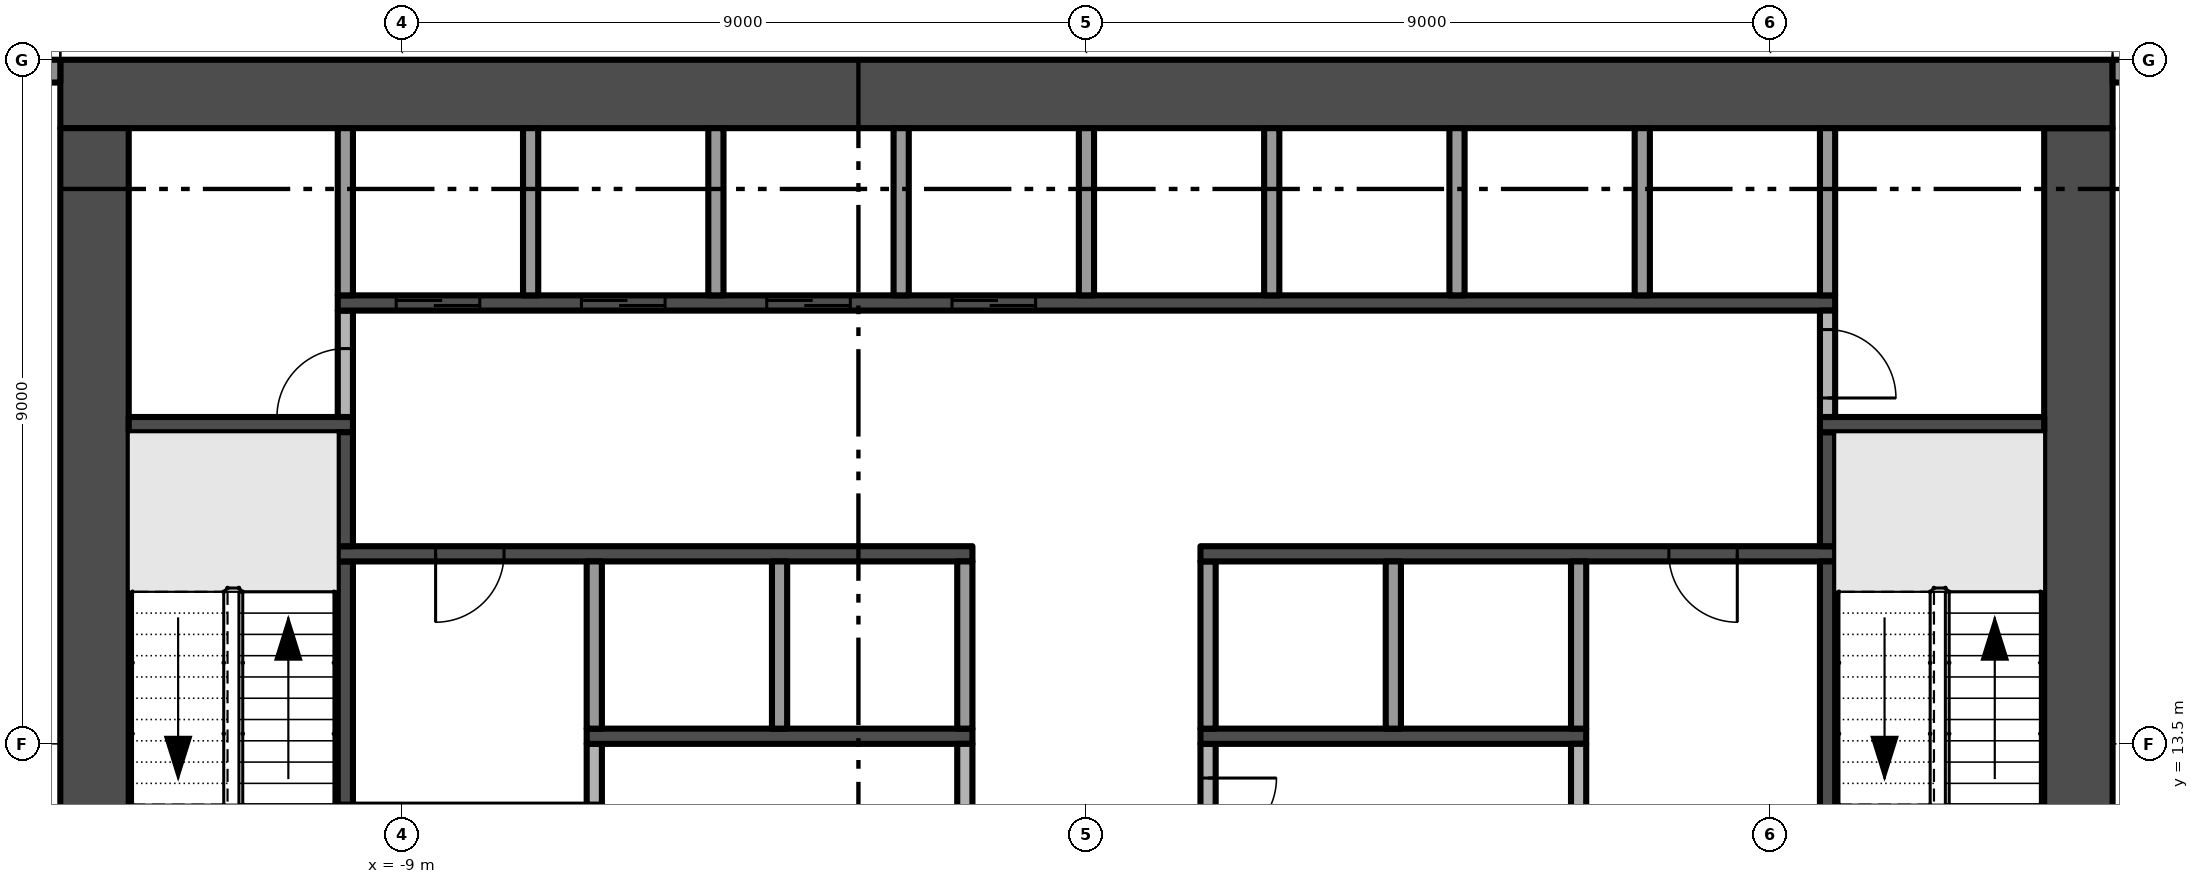
"""IFC4 building model, lengths in metres.
Left out: names, types, materials, properties, quantities, classifications, styles, units other than length and angle.
Written with IfcOpenShell. Run it as: python <this file> out.ifc"""

import sys

from ifc_helpers import new_model, si_unit, direction, frame, frame_2d, origin, place, context, subcontext, project, spatial, rectangle, extrude, element, fill, save


model = new_model("IFC4")
c1 = context("Model", 3, precision=1e-05, world=origin(), true_north=direction((0.0, 1.0)))
c2 = subcontext(c1, "Body", "Model", "MODEL_VIEW")
j1 = project(units=[si_unit("LENGTHUNIT", "METRE"), si_unit("PLANEANGLEUNIT", "RADIAN")], contexts=[c1])
p1 = place(None, origin())
s1 = spatial("IfcSite", under=j1, at=p1, CompositionType="ELEMENT")
p2 = place(p1, origin())
s2 = spatial("IfcBuilding", under=s1, at=p2, CompositionType="ELEMENT")
p3 = place(p2, frame((0.0, 0.0, 22.6)))
s3 = spatial("IfcBuildingStorey", under=s2, at=p3, CompositionType="ELEMENT", Elevation=22.6)
p4 = place(p3, frame((13.05, 5.4, -0.3), z_axis=(0.0, 0.0, 1.0), x_axis=(0.0, 1.0, 0.0)))
e1 = element("IfcWall", 1, at=p4, inside=s3, PredefinedType="SHEAR", context=c2, shape_type="SweptSolid", body=[
    extrude(rectangle(XDim=16.2, YDim=0.9, at=frame_2d((8.1, 0.0))), origin(), (0.0, 0.0, 1.0), 3.8),
])
p5 = place(p4, frame((6.0, 0.0, 0.3)))
e2 = element("IfcOpeningElement", 2, at=p5, cuts=e1, PredefinedType="OPENING", context=c2, shape_type="SweptSolid", body=[
    extrude(rectangle(XDim=1.2, YDim=2.2, at=frame_2d((0.6, 1.1))), frame((0.0, 0.46, 0.0), z_axis=(0.0, -1.0, 0.0), x_axis=(1.0, 0.0, 0.0)), (0.0, 0.0, 1.0), 0.92),
])
p6 = place(p3, frame((13.5, 22.05, -0.3), z_axis=(0.0, 0.0, 1.0), x_axis=(-1.0, 0.0, 0.0)))
e3 = element("IfcWall", 3, at=p6, inside=s3, PredefinedType="SHEAR", context=c2, shape_type="SweptSolid", body=[
    extrude(rectangle(XDim=27.0, YDim=0.9, at=frame_2d((13.5, 0.0))), origin(), (0.0, 0.0, 1.0), 3.8),
])
p7 = place(p3, frame((-13.05, 21.6, -0.3), z_axis=(0.0, 0.0, 1.0), x_axis=(0.0, -1.0, 0.0)))
e4 = element("IfcWall", 4, at=p7, inside=s3, PredefinedType="SHEAR", context=c2, shape_type="SweptSolid", body=[
    extrude(rectangle(XDim=16.2, YDim=0.9, at=frame_2d((8.1, 0.0))), origin(), (0.0, 0.0, 1.0), 3.8),
])
p8 = place(p7, frame((9.0, 0.0, 0.3)))
e5 = element("IfcOpeningElement", 5, at=p8, cuts=e4, PredefinedType="OPENING", context=c2, shape_type="SweptSolid", body=[
    extrude(rectangle(XDim=1.2, YDim=2.2, at=frame_2d((0.6, 1.1))), frame((0.0, 0.46, 0.0), z_axis=(0.0, -1.0, 0.0), x_axis=(1.0, 0.0, 0.0)), (0.0, 0.0, 1.0), 0.92),
])
p9 = place(p3, frame((13.5, 22.35, 0.0), z_axis=(0.0, 0.0, 1.0), x_axis=(1.0, 0.0, 0.0)))
e6 = element("IfcWall", 6, at=p9, inside=s3, PredefinedType="SOLIDWALL", context=c2, shape_type="SweptSolid", body=[
    extrude(rectangle(XDim=3.775, YDim=0.3, at=frame_2d((1.887, 0.0))), origin(), (0.0, 0.0, 1.0), 3.5),
])
p10 = place(p9, frame((0.85, 0.0, 0.45)))
e7 = element("IfcOpeningElement", 7, at=p10, cuts=e6, PredefinedType="OPENING", context=c2, shape_type="SweptSolid", body=[
    extrude(rectangle(XDim=2.6, YDim=2.65, at=frame_2d((1.3, 1.325))), frame((0.0, 0.16, 0.0), z_axis=(0.0, -1.0, 0.0), x_axis=(1.0, 0.0, 0.0)), (0.0, 0.0, 1.0), 0.32),
])
p11 = place(p3, frame((-17.275, 22.35, 0.0), z_axis=(0.0, 0.0, 1.0), x_axis=(1.0, 0.0, 0.0)))
e8 = element("IfcWall", 8, at=p11, inside=s3, PredefinedType="SOLIDWALL", context=c2, shape_type="SweptSolid", body=[
    extrude(rectangle(XDim=3.775, YDim=0.3, at=frame_2d((1.887, 0.0))), origin(), (0.0, 0.0, 1.0), 3.5),
])
p12 = place(p11, frame((0.325, 0.0, 0.0)))
e9 = element("IfcOpeningElement", 9, at=p12, cuts=e8, PredefinedType="OPENING", context=c2, shape_type="SweptSolid", body=[
    extrude(rectangle(XDim=2.6, YDim=2.4, at=frame_2d((1.3, 1.2))), frame((0.0, 0.16, 0.0), z_axis=(0.0, -1.0, 0.0), x_axis=(1.0, 0.0, 0.0)), (0.0, 0.0, 1.0), 0.32),
])
p13 = place(p3, frame((-12.6, 17.7, 0.0), z_axis=(0.0, 0.0, 1.0), x_axis=(1.0, 0.0, 0.0)))
e10 = element("IfcWall", 10, at=p13, inside=s3, PredefinedType="SHEAR", context=c2, shape_type="SweptSolid", body=[
    extrude(rectangle(XDim=2.95, YDim=0.2, at=frame_2d((1.475, 0.0))), origin(), (0.0, 0.0, 1.0), 3.5),
])
p14 = place(p3, frame((-9.75, 12.7, 0.0), z_axis=(0.0, 0.0, 1.0), x_axis=(0.0, 1.0, 0.0)))
e11 = element("IfcWall", 11, at=p14, inside=s3, PredefinedType="SHEAR", context=c2, shape_type="SweptSolid", body=[
    extrude(rectangle(XDim=3.2, YDim=0.2, at=frame_2d((1.6, 0.0))), origin(), (0.0, 0.0, 1.0), 3.5),
])
p15 = place(p3, frame((-1.5, 16.0, 0.0), z_axis=(0.0, 0.0, 1.0), x_axis=(-1.0, 0.0, 0.0)))
e12 = element("IfcWall", 12, at=p15, inside=s3, PredefinedType="SHEAR", context=c2, shape_type="SweptSolid", body=[
    extrude(rectangle(XDim=8.35, YDim=0.2, at=frame_2d((4.175, 0.0))), origin(), (0.0, 0.0, 1.0), 3.5),
])
p16 = place(p15, frame((6.162, 0.0, 0.0)))
e13 = element("IfcOpeningElement", 13, at=p16, cuts=e12, PredefinedType="OPENING", context=c2, shape_type="SweptSolid", body=[
    extrude(rectangle(XDim=0.9, YDim=2.1, at=frame_2d((0.45, 1.05))), frame((0.0, 0.11, 0.0), z_axis=(0.0, -1.0, 0.0), x_axis=(1.0, 0.0, 0.0)), (0.0, 0.0, 1.0), 0.22),
])
p17 = place(p3, frame((-9.75, 16.1, 0.0), z_axis=(0.0, 0.0, 1.0), x_axis=(0.0, 1.0, 0.0)))
e14 = element("IfcWall", 14, at=p17, inside=s3, PredefinedType="SHEAR", context=c2, shape_type="SweptSolid", body=[
    extrude(rectangle(XDim=1.5, YDim=0.2, at=frame_2d((0.75, 0.0))), origin(), (0.0, 0.0, 1.0), 3.5),
])
p18 = place(p3, frame((-9.75, 17.8, 0.0), z_axis=(0.0, 0.0, 1.0), x_axis=(0.0, 1.0, 0.0)))
e15 = element("IfcWall", 15, at=p18, inside=s3, PredefinedType="PARTITIONING", context=c2, shape_type="SweptSolid", body=[
    extrude(rectangle(XDim=1.4, YDim=0.2, at=frame_2d((0.7, 0.0))), origin(), (0.0, 0.0, 1.0), 3.5),
])
p19 = place(p18, origin())
e16 = element("IfcOpeningElement", 16, at=p19, cuts=e15, PredefinedType="OPENING", context=c2, shape_type="SweptSolid", body=[
    extrude(rectangle(XDim=0.9, YDim=2.1, at=frame_2d((0.45, 1.05))), frame((0.0, 0.11, 0.0), z_axis=(0.0, -1.0, 0.0), x_axis=(1.0, 0.0, 0.0)), (0.0, 0.0, 1.0), 0.22),
])
p20 = place(p3, frame((-9.85, 19.3, 0.0), z_axis=(0.0, 0.0, 1.0), x_axis=(1.0, 0.0, 0.0)))
e17 = element("IfcWall", 17, at=p20, inside=s3, PredefinedType="SHEAR", context=c2, shape_type="SweptSolid", body=[
    extrude(rectangle(XDim=19.7, YDim=0.2, at=frame_2d((9.85, 0.0))), origin(), (0.0, 0.0, 1.0), 3.5),
])
p21 = place(p20, frame((0.769, 0.0, 0.0)))
e18 = element("IfcOpeningElement", 18, at=p21, cuts=e17, PredefinedType="OPENING", context=c2, shape_type="SweptSolid", body=[
    extrude(rectangle(XDim=1.1, YDim=2.1, at=frame_2d((0.55, 1.05))), frame((0.0, 0.11, 0.0), z_axis=(0.0, -1.0, 0.0), x_axis=(1.0, 0.0, 0.0)), (0.0, 0.0, 1.0), 0.22),
])
p22 = place(p20, frame((3.206, 0.0, 0.0)))
e19 = element("IfcOpeningElement", 19, at=p22, cuts=e17, PredefinedType="OPENING", context=c2, shape_type="SweptSolid", body=[
    extrude(rectangle(XDim=1.1, YDim=2.1, at=frame_2d((0.55, 1.05))), frame((0.0, 0.11, 0.0), z_axis=(0.0, -1.0, 0.0), x_axis=(1.0, 0.0, 0.0)), (0.0, 0.0, 1.0), 0.22),
])
p23 = place(p20, frame((5.644, 0.0, 0.0)))
e20 = element("IfcOpeningElement", 20, at=p23, cuts=e17, PredefinedType="OPENING", context=c2, shape_type="SweptSolid", body=[
    extrude(rectangle(XDim=1.1, YDim=2.1, at=frame_2d((0.55, 1.05))), frame((0.0, 0.11, 0.0), z_axis=(0.0, -1.0, 0.0), x_axis=(1.0, 0.0, 0.0)), (0.0, 0.0, 1.0), 0.22),
])
p24 = place(p20, frame((8.081, 0.0, 0.0)))
e21 = element("IfcOpeningElement", 21, at=p24, cuts=e17, PredefinedType="OPENING", context=c2, shape_type="SweptSolid", body=[
    extrude(rectangle(XDim=1.1, YDim=2.1, at=frame_2d((0.55, 1.05))), frame((0.0, 0.11, 0.0), z_axis=(0.0, -1.0, 0.0), x_axis=(1.0, 0.0, 0.0)), (0.0, 0.0, 1.0), 0.22),
])
for number, where, z_axis, x_axis in (
    (22, (-9.75, 19.4, 0.0), (0.0, 0.0, 1.0), (0.0, 1.0, 0.0)),
    (23, (-7.312, 19.4, 0.0), (0.0, 0.0, 1.0), (0.0, 1.0, 0.0)),
):
    element("IfcWall", number, at=place(p3, frame(where, z_axis=z_axis, x_axis=x_axis)), inside=s3, PredefinedType="PARTITIONING", context=c2, shape_type="SweptSolid", body=[
        extrude(rectangle(XDim=2.2, YDim=0.2, at=frame_2d((1.1, 0.0))), origin(), (0.0, 0.0, 1.0), 3.5),
    ])
p25 = place(p3, frame((-6.475, 12.7, 0.0), z_axis=(0.0, 0.0, 1.0), x_axis=(0.0, 1.0, 0.0)))
e24 = element("IfcWall", 24, at=p25, inside=s3, PredefinedType="PARTITIONING", context=c2, shape_type="SweptSolid", body=[
    extrude(rectangle(XDim=0.8, YDim=0.2, at=frame_2d((0.4, 0.0))), origin(), (0.0, 0.0, 1.0), 3.5),
])
p26 = place(p3, frame((-6.575, 13.6, 0.0), z_axis=(0.0, 0.0, 1.0), x_axis=(1.0, 0.0, 0.0)))
e25 = element("IfcWall", 25, at=p26, inside=s3, PredefinedType="SHEAR", context=c2, shape_type="SweptSolid", body=[
    extrude(rectangle(XDim=5.075, YDim=0.2, at=frame_2d((2.538, 0.0))), origin(), (0.0, 0.0, 1.0), 3.5),
])
for number, where, z_axis, x_axis in (
    (26, (-6.475, 13.7, 0.0), (0.0, 0.0, 1.0), (0.0, 1.0, 0.0)),
    (27, (-4.875, 19.4, 0.0), (0.0, 0.0, 1.0), (0.0, 1.0, 0.0)),
    (28, (-4.037, 13.7, 0.0), (0.0, 0.0, 1.0), (0.0, 1.0, 0.0)),
    (29, (-2.438, 19.4, 0.0), (0.0, 0.0, 1.0), (0.0, 1.0, 0.0)),
):
    element("IfcWall", number, at=place(p3, frame(where, z_axis=z_axis, x_axis=x_axis)), inside=s3, PredefinedType="PARTITIONING", context=c2, shape_type="SweptSolid", body=[
        extrude(rectangle(XDim=2.2, YDim=0.2, at=frame_2d((1.1, 0.0))), origin(), (0.0, 0.0, 1.0), 3.5),
    ])
p27 = place(p3, frame((-1.6, 10.5, 0.0), z_axis=(0.0, 0.0, 1.0), x_axis=(0.0, 1.0, 0.0)))
e30 = element("IfcWall", 30, at=p27, inside=s3, PredefinedType="PARTITIONING", context=c2, shape_type="SweptSolid", body=[
    extrude(rectangle(XDim=3.0, YDim=0.2, at=frame_2d((1.5, 0.0))), origin(), (0.0, 0.0, 1.0), 3.5),
])
p28 = place(p27, frame((1.05, 0.0, 0.0)))
e31 = element("IfcOpeningElement", 31, at=p28, cuts=e30, PredefinedType="OPENING", context=c2, shape_type="SweptSolid", body=[
    extrude(rectangle(XDim=0.9, YDim=2.1, at=frame_2d((0.45, 1.05))), frame((0.0, 0.11, 0.0), z_axis=(0.0, -1.0, 0.0), x_axis=(1.0, 0.0, 0.0)), (0.0, 0.0, 1.0), 0.22),
])
for number, where, z_axis, x_axis in (
    (32, (-1.6, 13.7, 0.0), (0.0, 0.0, 1.0), (0.0, 1.0, 0.0)),
    (33, (0.0, 19.4, 0.0), (0.0, 0.0, 1.0), (0.0, 1.0, 0.0)),
):
    element("IfcWall", number, at=place(p3, frame(where, z_axis=z_axis, x_axis=x_axis)), inside=s3, PredefinedType="PARTITIONING", context=c2, shape_type="SweptSolid", body=[
        extrude(rectangle(XDim=2.2, YDim=0.2, at=frame_2d((1.1, 0.0))), origin(), (0.0, 0.0, 1.0), 3.5),
    ])
p29 = place(p3, frame((1.6, 13.5, 0.0), z_axis=(0.0, 0.0, 1.0), x_axis=(0.0, -1.0, 0.0)))
e34 = element("IfcWall", 34, at=p29, inside=s3, PredefinedType="PARTITIONING", context=c2, shape_type="SweptSolid", body=[
    extrude(rectangle(XDim=1.8, YDim=0.2, at=frame_2d((0.9, 0.0))), origin(), (0.0, 0.0, 1.0), 3.5),
])
p30 = place(p29, frame((0.45, 0.0, 0.0)))
e35 = element("IfcOpeningElement", 35, at=p30, cuts=e34, PredefinedType="OPENING", context=c2, shape_type="SweptSolid", body=[
    extrude(rectangle(XDim=0.9, YDim=2.1, at=frame_2d((0.45, 1.05))), frame((0.0, 0.11, 0.0), z_axis=(0.0, -1.0, 0.0), x_axis=(1.0, 0.0, 0.0)), (0.0, 0.0, 1.0), 0.22),
])
p31 = place(p3, frame((1.5, 13.6, 0.0), z_axis=(0.0, 0.0, 1.0), x_axis=(1.0, 0.0, 0.0)))
e36 = element("IfcWall", 36, at=p31, inside=s3, PredefinedType="SHEAR", context=c2, shape_type="SweptSolid", body=[
    extrude(rectangle(XDim=5.075, YDim=0.2, at=frame_2d((2.538, 0.0))), origin(), (0.0, 0.0, 1.0), 3.5),
])
p32 = place(p3, frame((1.6, 13.7, 0.0), z_axis=(0.0, 0.0, 1.0), x_axis=(0.0, 1.0, 0.0)))
e37 = element("IfcWall", 37, at=p32, inside=s3, PredefinedType="PARTITIONING", context=c2, shape_type="SweptSolid", body=[
    extrude(rectangle(XDim=2.2, YDim=0.2, at=frame_2d((1.1, 0.0))), origin(), (0.0, 0.0, 1.0), 3.5),
])
p33 = place(p3, frame((9.85, 16.0, 0.0), z_axis=(0.0, 0.0, 1.0), x_axis=(-1.0, 0.0, 0.0)))
e38 = element("IfcWall", 38, at=p33, inside=s3, PredefinedType="SHEAR", context=c2, shape_type="SweptSolid", body=[
    extrude(rectangle(XDim=8.35, YDim=0.2, at=frame_2d((4.175, 0.0))), origin(), (0.0, 0.0, 1.0), 3.5),
])
p34 = place(p33, frame((1.288, 0.0, 0.0)))
e39 = element("IfcOpeningElement", 39, at=p34, cuts=e38, PredefinedType="OPENING", context=c2, shape_type="SweptSolid", body=[
    extrude(rectangle(XDim=0.9, YDim=2.1, at=frame_2d((0.45, 1.05))), frame((0.0, 0.11, 0.0), z_axis=(0.0, -1.0, 0.0), x_axis=(1.0, 0.0, 0.0)), (0.0, 0.0, 1.0), 0.22),
])
for number, where, z_axis, x_axis in (
    (40, (2.438, 19.4, 0.0), (0.0, 0.0, 1.0), (0.0, 1.0, 0.0)),
    (41, (4.037, 13.7, 0.0), (0.0, 0.0, 1.0), (0.0, 1.0, 0.0)),
    (42, (4.875, 19.4, 0.0), (0.0, 0.0, 1.0), (0.0, 1.0, 0.0)),
):
    element("IfcWall", number, at=place(p3, frame(where, z_axis=z_axis, x_axis=x_axis)), inside=s3, PredefinedType="PARTITIONING", context=c2, shape_type="SweptSolid", body=[
        extrude(rectangle(XDim=2.2, YDim=0.2, at=frame_2d((1.1, 0.0))), origin(), (0.0, 0.0, 1.0), 3.5),
    ])
p35 = place(p3, frame((6.475, 12.3, 0.0), z_axis=(0.0, 0.0, 1.0), x_axis=(0.0, 1.0, 0.0)))
e43 = element("IfcWall", 43, at=p35, inside=s3, PredefinedType="PARTITIONING", context=c2, shape_type="SweptSolid", body=[
    extrude(rectangle(XDim=1.2, YDim=0.2, at=frame_2d((0.6, 0.0))), origin(), (0.0, 0.0, 1.0), 3.5),
])
for number, where, z_axis, x_axis in (
    (44, (6.475, 13.7, 0.0), (0.0, 0.0, 1.0), (0.0, 1.0, 0.0)),
    (45, (7.312, 19.4, 0.0), (0.0, 0.0, 1.0), (0.0, 1.0, 0.0)),
):
    element("IfcWall", number, at=place(p3, frame(where, z_axis=z_axis, x_axis=x_axis)), inside=s3, PredefinedType="PARTITIONING", context=c2, shape_type="SweptSolid", body=[
        extrude(rectangle(XDim=2.2, YDim=0.2, at=frame_2d((1.1, 0.0))), origin(), (0.0, 0.0, 1.0), 3.5),
    ])
p36 = place(p3, frame((9.75, 12.3, 0.0), z_axis=(0.0, 0.0, 1.0), x_axis=(0.0, 1.0, 0.0)))
e46 = element("IfcWall", 46, at=p36, inside=s3, PredefinedType="SHEAR", context=c2, shape_type="SweptSolid", body=[
    extrude(rectangle(XDim=3.6, YDim=0.2, at=frame_2d((1.8, 0.0))), origin(), (0.0, 0.0, 1.0), 3.5),
])
p37 = place(p3, frame((9.75, 16.1, 0.0), z_axis=(0.0, 0.0, 1.0), x_axis=(0.0, 1.0, 0.0)))
e47 = element("IfcWall", 47, at=p37, inside=s3, PredefinedType="SHEAR", context=c2, shape_type="SweptSolid", body=[
    extrude(rectangle(XDim=1.5, YDim=0.2, at=frame_2d((0.75, 0.0))), origin(), (0.0, 0.0, 1.0), 3.5),
])
p38 = place(p3, frame((9.65, 17.7, 0.0), z_axis=(0.0, 0.0, 1.0), x_axis=(1.0, 0.0, 0.0)))
e48 = element("IfcWall", 48, at=p38, inside=s3, PredefinedType="SHEAR", context=c2, shape_type="SweptSolid", body=[
    extrude(rectangle(XDim=2.95, YDim=0.2, at=frame_2d((1.475, 0.0))), origin(), (0.0, 0.0, 1.0), 3.5),
])
p39 = place(p3, frame((9.75, 19.2, 0.0), z_axis=(0.0, 0.0, 1.0), x_axis=(0.0, -1.0, 0.0)))
e49 = element("IfcWall", 49, at=p39, inside=s3, PredefinedType="PARTITIONING", context=c2, shape_type="SweptSolid", body=[
    extrude(rectangle(XDim=1.4, YDim=0.2, at=frame_2d((0.7, 0.0))), origin(), (0.0, 0.0, 1.0), 3.5),
])
p40 = place(p39, frame((0.25, 0.0, 0.0)))
e50 = element("IfcOpeningElement", 50, at=p40, cuts=e49, PredefinedType="OPENING", context=c2, shape_type="SweptSolid", body=[
    extrude(rectangle(XDim=0.9, YDim=2.1, at=frame_2d((0.45, 1.05))), frame((0.0, 0.11, 0.0), z_axis=(0.0, -1.0, 0.0), x_axis=(1.0, 0.0, 0.0)), (0.0, 0.0, 1.0), 0.22),
])
p41 = place(p3, frame((9.75, 19.4, 0.0), z_axis=(0.0, 0.0, 1.0), x_axis=(0.0, 1.0, 0.0)))
e51 = element("IfcWall", 51, at=p41, inside=s3, PredefinedType="PARTITIONING", context=c2, shape_type="SweptSolid", body=[
    extrude(rectangle(XDim=2.2, YDim=0.2, at=frame_2d((1.1, 0.0))), origin(), (0.0, 0.0, 1.0), 3.5),
])
p42 = place(p21, origin())
e52 = element("IfcDoor", 52, at=p42, inside=s3, OperationType="SLIDING_TO_LEFT", PredefinedType="DOOR", context=c2, shape_type="SweptSolid", body=[
    extrude(rectangle(XDim=1.1, YDim=2.1, at=frame_2d((0.55, 1.05))), frame((0.0, 0.025, 0.0), z_axis=(0.0, -1.0, 0.0), x_axis=(1.0, 0.0, 0.0)), (0.0, 0.0, 1.0), 0.05),
])
fill(e18, e52)
p43 = place(p22, origin())
e53 = element("IfcDoor", 53, at=p43, inside=s3, OperationType="SLIDING_TO_LEFT", PredefinedType="DOOR", context=c2, shape_type="SweptSolid", body=[
    extrude(rectangle(XDim=1.1, YDim=2.1, at=frame_2d((0.55, 1.05))), frame((0.0, 0.025, 0.0), z_axis=(0.0, -1.0, 0.0), x_axis=(1.0, 0.0, 0.0)), (0.0, 0.0, 1.0), 0.05),
])
fill(e19, e53)
p44 = place(p23, origin())
e54 = element("IfcDoor", 54, at=p44, inside=s3, OperationType="SLIDING_TO_LEFT", PredefinedType="DOOR", context=c2, shape_type="SweptSolid", body=[
    extrude(rectangle(XDim=1.1, YDim=2.1, at=frame_2d((0.55, 1.05))), frame((0.0, 0.025, 0.0), z_axis=(0.0, -1.0, 0.0), x_axis=(1.0, 0.0, 0.0)), (0.0, 0.0, 1.0), 0.05),
])
fill(e20, e54)
p45 = place(p24, origin())
e55 = element("IfcDoor", 55, at=p45, inside=s3, OperationType="SLIDING_TO_LEFT", PredefinedType="DOOR", context=c2, shape_type="SweptSolid", body=[
    extrude(rectangle(XDim=1.1, YDim=2.1, at=frame_2d((0.55, 1.05))), frame((0.0, 0.025, 0.0), z_axis=(0.0, -1.0, 0.0), x_axis=(1.0, 0.0, 0.0)), (0.0, 0.0, 1.0), 0.05),
])
fill(e21, e55)
p46 = place(p16, origin())
e56 = element("IfcDoor", 56, at=p46, inside=s3, OperationType="SINGLE_SWING_RIGHT", PredefinedType="DOOR", context=c2, shape_type="SweptSolid", body=[
    extrude(rectangle(XDim=0.9, YDim=2.1, at=frame_2d((0.45, 1.05))), frame((0.0, 0.025, 0.0), z_axis=(0.0, -1.0, 0.0), x_axis=(1.0, 0.0, 0.0)), (0.0, 0.0, 1.0), 0.05),
])
fill(e13, e56)
p47 = place(p30, origin())
e57 = element("IfcDoor", 57, at=p47, inside=s3, OperationType="SINGLE_SWING_LEFT", PredefinedType="DOOR", context=c2, shape_type="SweptSolid", body=[
    extrude(rectangle(XDim=0.9, YDim=2.1, at=frame_2d((0.45, 1.05))), frame((0.0, 0.025, 0.0), z_axis=(0.0, -1.0, 0.0), x_axis=(1.0, 0.0, 0.0)), (0.0, 0.0, 1.0), 0.05),
])
fill(e35, e57)
p48 = place(p34, origin())
e58 = element("IfcDoor", 58, at=p48, inside=s3, OperationType="SINGLE_SWING_LEFT", PredefinedType="DOOR", context=c2, shape_type="SweptSolid", body=[
    extrude(rectangle(XDim=0.9, YDim=2.1, at=frame_2d((0.45, 1.05))), frame((0.0, 0.025, 0.0), z_axis=(0.0, -1.0, 0.0), x_axis=(1.0, 0.0, 0.0)), (0.0, 0.0, 1.0), 0.05),
])
fill(e39, e58)
p49 = place(p19, origin())
e59 = element("IfcDoor", 59, at=p49, inside=s3, OperationType="SINGLE_SWING_LEFT", PredefinedType="DOOR", context=c2, shape_type="SweptSolid", body=[
    extrude(rectangle(XDim=0.9, YDim=2.1, at=frame_2d((0.45, 1.05))), frame((0.0, 0.025, 0.0), z_axis=(0.0, -1.0, 0.0), x_axis=(1.0, 0.0, 0.0)), (0.0, 0.0, 1.0), 0.05),
])
fill(e16, e59)
p50 = place(p40, origin())
e60 = element("IfcDoor", 60, at=p50, inside=s3, OperationType="SINGLE_SWING_RIGHT", PredefinedType="DOOR", context=c2, shape_type="SweptSolid", body=[
    extrude(rectangle(XDim=0.9, YDim=2.1, at=frame_2d((0.45, 1.05))), frame((0.0, 0.025, 0.0), z_axis=(0.0, -1.0, 0.0), x_axis=(1.0, 0.0, 0.0)), (0.0, 0.0, 1.0), 0.05),
])
fill(e50, e60)
save(model, sys.argv[1])
